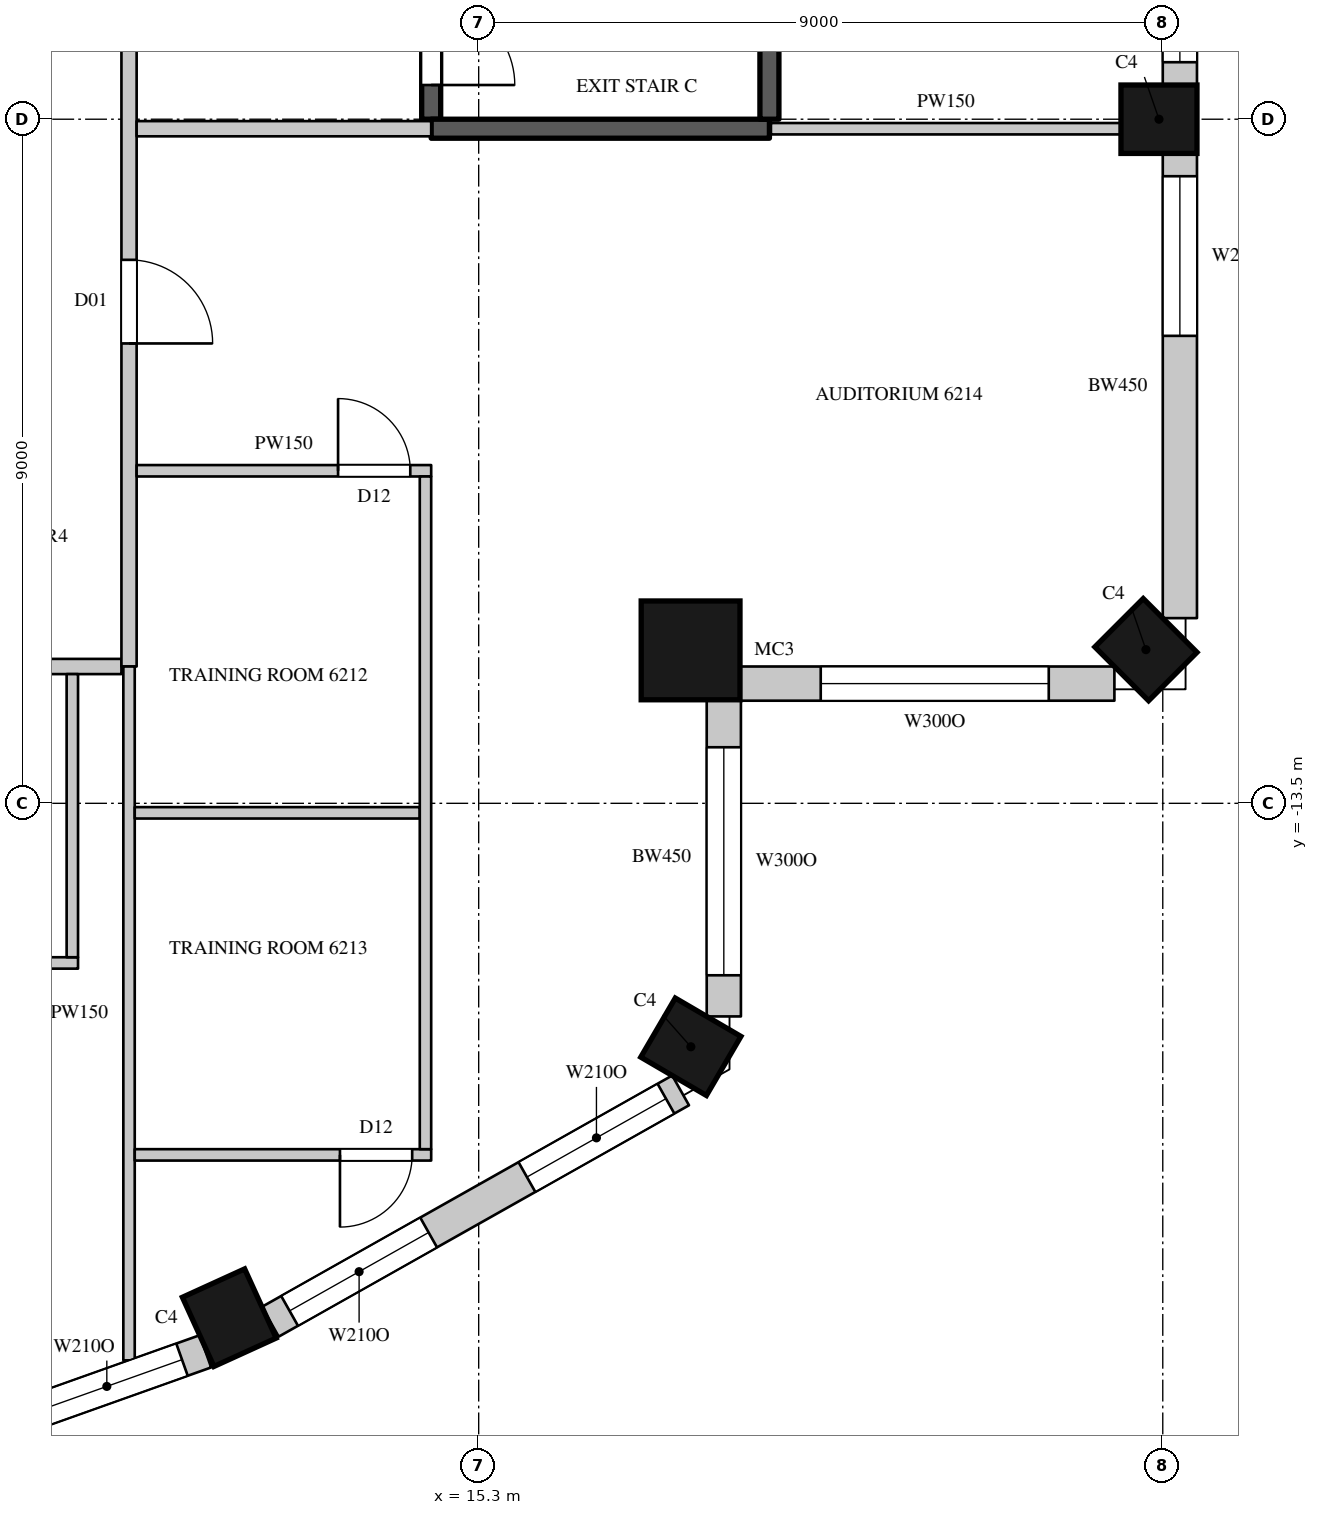
"""IFC4 building model, lengths in metres.
Left out: names, types, materials, properties, quantities, classifications, styles, units other than length and angle.
Written with IfcOpenShell. Run it as: python <this file> out.ifc"""

import sys

from ifc_helpers import new_model, si_unit, direction, frame, frame_2d, origin, origin_2d, place, context, subcontext, project, spatial, rectangle, circle, extrude, element, fill, save


model = new_model("IFC4")
c1 = context("Model", 3, precision=1e-05, world=origin(), true_north=direction((0.0, 1.0)))
c2 = subcontext(c1, "Body", "Model", "MODEL_VIEW")
j1 = project(units=[si_unit("LENGTHUNIT", "METRE"), si_unit("PLANEANGLEUNIT", "RADIAN")], contexts=[c1])
p1 = place(None, origin())
s1 = spatial("IfcSite", under=j1, at=p1, CompositionType="ELEMENT")
p2 = place(p1, origin())
s2 = spatial("IfcBuilding", under=s1, at=p2, CompositionType="ELEMENT")
p3 = place(p2, frame((0.0, 0.0, 276.2)))
s3 = spatial("IfcBuildingStorey", under=s2, at=p3, CompositionType="ELEMENT", Elevation=276.2)
for number, where, z_axis, x_axis in (
    (1, (12.019, -20.267, 0.0), (0.0, 0.0, 1.0), (0.91, 0.415, 0.0)),
    (2, (18.091, -16.703, 0.0), (0.0, 0.0, 1.0), (0.504, 0.863, 0.0)),
):
    element("IfcColumn", number, at=place(p3, frame(where, z_axis=z_axis, x_axis=x_axis)), inside=s3, PredefinedType="COLUMN", context=c2, shape_type="SweptSolid", body=[
        extrude(rectangle(XDim=0.9, YDim=1.0, at=origin_2d()), origin(), (0.0, 0.0, 1.0), 4.1),
    ])
p4 = place(p3, frame((18.088, -11.488, 0.0), z_axis=(0.0, 0.0, 1.0), x_axis=(1.0, 0.0, 0.0)))
e3 = element("IfcColumn", 3, at=p4, inside=s3, PredefinedType="COLUMN", context=c2, shape_type="SweptSolid", body=[
    extrude(circle(Radius=0.65, at=origin_2d()), origin(), (0.0, 0.0, 1.0), 4.1),
])
for number, where, z_axis, x_axis in (
    (4, (24.078, -11.478, 0.0), (0.0, 0.0, 1.0), (0.707, 0.707, 0.0)),
    (5, (24.25, -4.5, 0.0), (0.0, 0.0, 1.0), (0.0, 1.0, 0.0)),
):
    element("IfcColumn", number, at=place(p3, frame(where, z_axis=z_axis, x_axis=x_axis)), inside=s3, PredefinedType="COLUMN", context=c2, shape_type="SweptSolid", body=[
        extrude(rectangle(XDim=0.9, YDim=1.0, at=origin_2d()), origin(), (0.0, 0.0, 1.0), 4.1),
    ])
p5 = place(p3, frame((5.665, -22.859, 0.0), z_axis=(0.0, 0.0, 1.0), x_axis=(0.942108340262, 0.335308626803, 0.0)))
e6 = element("IfcWall", 6, at=p5, inside=s3, PredefinedType="SOLIDWALL", context=c2, shape_type="SweptSolid", body=[
    extrude(rectangle(XDim=6.412, YDim=0.45, at=frame_2d((3.206, 0.0))), origin(), (0.0, 0.0, 1.0), 3.8),
])
p6 = place(p5, frame((0.327, 0.0, 1.05)))
e7 = element("IfcOpeningElement", 7, at=p6, cuts=e6, PredefinedType="OPENING", context=c2, shape_type="SweptSolid", body=[
    extrude(rectangle(XDim=2.1, YDim=2.4, at=frame_2d((1.05, 1.2))), frame((0.0, 0.235, 0.0), z_axis=(0.0, -1.0, 0.0), x_axis=(1.0, 0.0, 0.0)), (0.0, 0.0, 1.0), 0.47),
])
p7 = place(p5, frame((3.985, 0.0, 1.05)))
e8 = element("IfcOpeningElement", 8, at=p7, cuts=e6, PredefinedType="OPENING", context=c2, shape_type="SweptSolid", body=[
    extrude(rectangle(XDim=2.1, YDim=2.4, at=frame_2d((1.05, 1.2))), frame((0.0, 0.235, 0.0), z_axis=(0.0, -1.0, 0.0), x_axis=(1.0, 0.0, 0.0)), (0.0, 0.0, 1.0), 0.47),
])
p8 = place(p3, frame((12.559, -20.32, 0.0), z_axis=(0.0, 0.0, 1.0), x_axis=(0.871065783524, 0.491166367714, 0.0)))
e9 = element("IfcWall", 9, at=p8, inside=s3, PredefinedType="SOLIDWALL", context=c2, shape_type="SweptSolid", body=[
    extrude(rectangle(XDim=6.196, YDim=0.45, at=frame_2d((3.098, 0.0))), origin(), (0.0, 0.0, 1.0), 3.8),
])
p9 = place(p8, frame((0.291, 0.0, 1.05)))
e10 = element("IfcOpeningElement", 10, at=p9, cuts=e9, PredefinedType="OPENING", context=c2, shape_type="SweptSolid", body=[
    extrude(rectangle(XDim=2.1, YDim=2.4, at=frame_2d((1.05, 1.2))), frame((0.0, 0.235, 0.0), z_axis=(0.0, -1.0, 0.0), x_axis=(1.0, 0.0, 0.0)), (0.0, 0.0, 1.0), 0.47),
])
p10 = place(p8, frame((3.875, 0.0, 1.05)))
e11 = element("IfcOpeningElement", 11, at=p10, cuts=e9, PredefinedType="OPENING", context=c2, shape_type="SweptSolid", body=[
    extrude(rectangle(XDim=2.1, YDim=2.4, at=frame_2d((1.05, 1.2))), frame((0.0, 0.235, 0.0), z_axis=(0.0, -1.0, 0.0), x_axis=(1.0, 0.0, 0.0)), (0.0, 0.0, 1.0), 0.47),
])
p11 = place(p3, frame((18.525, -16.304, 0.0), z_axis=(0.0, 0.0, 1.0), x_axis=(0.0, 1.0, 0.0)))
e12 = element("IfcWall", 12, at=p11, inside=s3, PredefinedType="SOLIDWALL", context=c2, shape_type="SweptSolid", body=[
    extrude(rectangle(XDim=4.202, YDim=0.45, at=frame_2d((2.101, 0.0))), origin(), (0.0, 0.0, 1.0), 3.8),
])
p12 = place(p11, frame((0.541, 0.0, 1.05)))
e13 = element("IfcOpeningElement", 13, at=p12, cuts=e12, PredefinedType="OPENING", context=c2, shape_type="SweptSolid", body=[
    extrude(rectangle(XDim=3.0, YDim=2.4, at=frame_2d((1.5, 1.2))), frame((0.0, 0.235, 0.0), z_axis=(0.0, -1.0, 0.0), x_axis=(1.0, 0.0, 0.0)), (0.0, 0.0, 1.0), 0.47),
])
p13 = place(p3, frame((18.701, -11.925, 0.0), z_axis=(0.0, 0.0, 1.0), x_axis=(1.0, 0.0, 0.0)))
e14 = element("IfcWall", 14, at=p13, inside=s3, PredefinedType="SOLIDWALL", context=c2, shape_type="SweptSolid", body=[
    extrude(rectangle(XDim=4.962, YDim=0.45, at=frame_2d((2.481, 0.0))), origin(), (0.0, 0.0, 1.0), 3.8),
])
p14 = place(p13, frame((1.098, 0.0, 1.05)))
e15 = element("IfcOpeningElement", 15, at=p14, cuts=e14, PredefinedType="OPENING", context=c2, shape_type="SweptSolid", body=[
    extrude(rectangle(XDim=3.0, YDim=2.4, at=frame_2d((1.5, 1.2))), frame((0.0, 0.235, 0.0), z_axis=(0.0, -1.0, 0.0), x_axis=(1.0, 0.0, 0.0)), (0.0, 0.0, 1.0), 0.47),
])
p15 = place(p3, frame((24.525, -11.064, 0.0), z_axis=(0.0, 0.0, 1.0), x_axis=(0.0, 1.0, 0.0)))
e16 = element("IfcWall", 16, at=p15, inside=s3, PredefinedType="SOLIDWALL", context=c2, shape_type="SweptSolid", body=[
    extrude(rectangle(XDim=6.114, YDim=0.45, at=frame_2d((3.057, 0.0))), origin(), (0.0, 0.0, 1.0), 3.8),
])
p16 = place(p15, frame((3.714, 0.0, 1.05)))
e17 = element("IfcOpeningElement", 17, at=p16, cuts=e16, PredefinedType="OPENING", context=c2, shape_type="SweptSolid", body=[
    extrude(rectangle(XDim=2.1, YDim=2.4, at=frame_2d((1.05, 1.2))), frame((0.0, 0.235, 0.0), z_axis=(0.0, -1.0, 0.0), x_axis=(1.0, 0.0, 0.0)), (0.0, 0.0, 1.0), 0.47),
])
p17 = place(p3, frame((24.525, -4.05, 0.0), z_axis=(0.0, 0.0, 1.0), x_axis=(0.0, 1.0, 0.0)))
e18 = element("IfcWall", 18, at=p17, inside=s3, PredefinedType="SOLIDWALL", context=c2, shape_type="SweptSolid", body=[
    extrude(rectangle(XDim=8.1, YDim=0.45, at=frame_2d((4.05, 0.0))), origin(), (0.0, 0.0, 1.0), 3.8),
])
p18 = place(p17, frame((0.3, 0.0, 1.05)))
e19 = element("IfcOpeningElement", 19, at=p18, cuts=e18, PredefinedType="OPENING", context=c2, shape_type="SweptSolid", body=[
    extrude(rectangle(XDim=3.0, YDim=2.4, at=frame_2d((1.5, 1.2))), frame((0.0, 0.235, 0.0), z_axis=(0.0, -1.0, 0.0), x_axis=(1.0, 0.0, 0.0)), (0.0, 0.0, 1.0), 0.47),
])
p19 = place(p17, frame((4.8, 0.0, 1.05)))
e20 = element("IfcOpeningElement", 20, at=p19, cuts=e18, PredefinedType="OPENING", context=c2, shape_type="SweptSolid", body=[
    extrude(rectangle(XDim=3.0, YDim=2.4, at=frame_2d((1.5, 1.2))), frame((0.0, 0.235, 0.0), z_axis=(0.0, -1.0, 0.0), x_axis=(1.0, 0.0, 0.0)), (0.0, 0.0, 1.0), 0.47),
])
p20 = place(p3, frame((-10.9, -11.7, 0.0), z_axis=(0.0, 0.0, 1.0), x_axis=(1.0, 0.0, 0.0)))
e21 = element("IfcWall", 21, at=p20, inside=s3, PredefinedType="PARTITIONING", context=c2, shape_type="SweptSolid", body=[
    extrude(rectangle(XDim=21.5, YDim=0.2, at=frame_2d((10.75, 0.0))), origin(), (0.0, 0.0, 1.0), 3.8),
])
p21 = place(p20, frame((0.95, 0.0, 0.0)))
e22 = element("IfcOpeningElement", 22, at=p21, cuts=e21, PredefinedType="OPENING", context=c2, shape_type="SweptSolid", body=[
    extrude(rectangle(XDim=0.95, YDim=2.2, at=frame_2d((0.475, 1.1))), frame((0.0, 0.11, 0.0), z_axis=(0.0, -1.0, 0.0), x_axis=(1.0, 0.0, 0.0)), (0.0, 0.0, 1.0), 0.22),
])
p22 = place(p20, frame((4.2, 0.0, 0.0)))
e23 = element("IfcOpeningElement", 23, at=p22, cuts=e21, PredefinedType="OPENING", context=c2, shape_type="SweptSolid", body=[
    extrude(rectangle(XDim=0.9, YDim=2.2, at=frame_2d((0.45, 1.1))), frame((0.0, 0.11, 0.0), z_axis=(0.0, -1.0, 0.0), x_axis=(1.0, 0.0, 0.0)), (0.0, 0.0, 1.0), 0.22),
])
p23 = place(p20, frame((6.85, 0.0, 0.0)))
e24 = element("IfcOpeningElement", 24, at=p23, cuts=e21, PredefinedType="OPENING", context=c2, shape_type="SweptSolid", body=[
    extrude(rectangle(XDim=1.1, YDim=2.4, at=frame_2d((0.55, 1.2))), frame((0.0, 0.11, 0.0), z_axis=(0.0, -1.0, 0.0), x_axis=(1.0, 0.0, 0.0)), (0.0, 0.0, 1.0), 0.22),
])
p24 = place(p20, frame((9.95, 0.0, 0.0)))
e25 = element("IfcOpeningElement", 25, at=p24, cuts=e21, PredefinedType="OPENING", context=c2, shape_type="SweptSolid", body=[
    extrude(rectangle(XDim=1.1, YDim=2.4, at=frame_2d((0.55, 1.2))), frame((0.0, 0.11, 0.0), z_axis=(0.0, -1.0, 0.0), x_axis=(1.0, 0.0, 0.0)), (0.0, 0.0, 1.0), 0.22),
])
p25 = place(p3, frame((10.7, -11.7, 0.0), z_axis=(0.0, 0.0, 1.0), x_axis=(0.0, 1.0, 0.0)))
e26 = element("IfcWall", 26, at=p25, inside=s3, PredefinedType="PARTITIONING", context=c2, shape_type="SweptSolid", body=[
    extrude(rectangle(XDim=23.8, YDim=0.2, at=frame_2d((11.9, 0.0))), origin(), (0.0, 0.0, 1.0), 3.8),
])
p26 = place(p25, frame((12.35, 0.0, 0.0)))
e27 = element("IfcOpeningElement", 27, at=p26, cuts=e26, PredefinedType="OPENING", context=c2, shape_type="SweptSolid", body=[
    extrude(rectangle(XDim=1.5, YDim=2.4, at=frame_2d((0.75, 1.2))), frame((0.0, 0.11, 0.0), z_axis=(0.0, -1.0, 0.0), x_axis=(1.0, 0.0, 0.0)), (0.0, 0.0, 1.0), 0.22),
])
p27 = place(p25, frame((19.55, 0.0, 0.0)))
e28 = element("IfcOpeningElement", 28, at=p27, cuts=e26, PredefinedType="OPENING", context=c2, shape_type="SweptSolid", body=[
    extrude(rectangle(XDim=1.1, YDim=2.4, at=frame_2d((0.55, 1.2))), frame((0.0, 0.11, 0.0), z_axis=(0.0, -1.0, 0.0), x_axis=(1.0, 0.0, 0.0)), (0.0, 0.0, 1.0), 0.22),
])
p28 = place(p25, frame((4.25, 0.0, 0.0)))
e29 = element("IfcOpeningElement", 29, at=p28, cuts=e26, PredefinedType="OPENING", context=c2, shape_type="SweptSolid", body=[
    extrude(rectangle(XDim=1.1, YDim=2.4, at=frame_2d((0.55, 1.2))), frame((0.0, 0.11, 0.0), z_axis=(0.0, -1.0, 0.0), x_axis=(1.0, 0.0, 0.0)), (0.0, 0.0, 1.0), 0.22),
])
p29 = place(p3, frame((10.8, -4.625, 0.0), z_axis=(0.0, 0.0, 1.0), x_axis=(1.0, 0.0, 0.0)))
e30 = element("IfcWall", 30, at=p29, inside=s3, PredefinedType="PARTITIONING", context=c2, shape_type="SweptSolid", body=[
    extrude(rectangle(XDim=3.875, YDim=0.2, at=frame_2d((1.938, 0.0))), origin(), (0.0, 0.0, 1.0), 3.8),
])
p30 = place(p3, frame((2.379, -15.6, 0.0), z_axis=(0.0, 0.0, 1.0), x_axis=(1.0, 0.0, 0.0)))
e31 = element("IfcWall", 31, at=p30, inside=s3, PredefinedType="PARTITIONING", context=c2, shape_type="SweptSolid", body=[
    extrude(rectangle(XDim=7.65, YDim=0.15, at=frame_2d((3.825, 0.0))), origin(), (0.0, 0.0, 1.0), 3.8),
])
p31 = place(p30, frame((4.85, 0.0, 0.0)))
e32 = element("IfcOpeningElement", 32, at=p31, cuts=e31, PredefinedType="OPENING", context=c2, shape_type="SweptSolid", body=[
    extrude(rectangle(XDim=0.95, YDim=2.2, at=frame_2d((0.475, 1.1))), frame((0.0, 0.085, 0.0), z_axis=(0.0, -1.0, 0.0), x_axis=(1.0, 0.0, 0.0)), (0.0, 0.0, 1.0), 0.17),
])
p32 = place(p3, frame((9.954, -15.525, 0.0), z_axis=(0.0, 0.0, 1.0), x_axis=(0.0, 1.0, 0.0)))
e33 = element("IfcWall", 33, at=p32, inside=s3, PredefinedType="PARTITIONING", context=c2, shape_type="SweptSolid", body=[
    extrude(rectangle(XDim=3.725, YDim=0.15, at=frame_2d((1.862, 0.0))), origin(), (0.0, 0.0, 1.0), 3.8),
])
p33 = place(p3, frame((10.7, -20.828, 0.0), z_axis=(0.0, 0.0, 1.0), x_axis=(0.0, 1.0, 0.0)))
e34 = element("IfcWall", 34, at=p33, inside=s3, PredefinedType="PARTITIONING", context=c2, shape_type="SweptSolid", body=[
    extrude(rectangle(XDim=9.128, YDim=0.15, at=frame_2d((4.564, 0.0))), origin(), (0.0, 0.0, 1.0), 3.8),
])
p34 = place(p3, frame((10.775, -18.125, 0.0), z_axis=(0.0, 0.0, 1.0), x_axis=(1.0, 0.0, 0.0)))
e35 = element("IfcWall", 35, at=p34, inside=s3, PredefinedType="PARTITIONING", context=c2, shape_type="SweptSolid", body=[
    extrude(rectangle(XDim=3.9, YDim=0.15, at=frame_2d((1.95, 0.0))), origin(), (0.0, 0.0, 1.0), 3.8),
])
p35 = place(p34, frame((2.7, 0.0, 0.0)))
e36 = element("IfcOpeningElement", 36, at=p35, cuts=e35, PredefinedType="OPENING", context=c2, shape_type="SweptSolid", body=[
    extrude(rectangle(XDim=0.95, YDim=2.2, at=frame_2d((0.475, 1.1))), frame((0.0, 0.085, 0.0), z_axis=(0.0, -1.0, 0.0), x_axis=(1.0, 0.0, 0.0)), (0.0, 0.0, 1.0), 0.17),
])
p36 = place(p3, frame((10.775, -13.625, 0.0), z_axis=(0.0, 0.0, 1.0), x_axis=(1.0, 0.0, 0.0)))
e37 = element("IfcWall", 37, at=p36, inside=s3, PredefinedType="PARTITIONING", context=c2, shape_type="SweptSolid", body=[
    extrude(rectangle(XDim=3.75, YDim=0.15, at=frame_2d((1.875, 0.0))), origin(), (0.0, 0.0, 1.0), 3.8),
])
p37 = place(p3, frame((10.8, -9.125, 0.0), z_axis=(0.0, 0.0, 1.0), x_axis=(1.0, 0.0, 0.0)))
e38 = element("IfcWall", 38, at=p37, inside=s3, PredefinedType="PARTITIONING", context=c2, shape_type="SweptSolid", body=[
    extrude(rectangle(XDim=3.875, YDim=0.15, at=frame_2d((1.938, 0.0))), origin(), (0.0, 0.0, 1.0), 3.8),
])
p38 = place(p37, frame((2.65, 0.0, 0.0)))
e39 = element("IfcOpeningElement", 39, at=p38, cuts=e38, PredefinedType="OPENING", context=c2, shape_type="SweptSolid", body=[
    extrude(rectangle(XDim=0.95, YDim=2.2, at=frame_2d((0.475, 1.1))), frame((0.0, 0.085, 0.0), z_axis=(0.0, -1.0, 0.0), x_axis=(1.0, 0.0, 0.0)), (0.0, 0.0, 1.0), 0.17),
])
p39 = place(p3, frame((14.6, -18.05, 0.0), z_axis=(0.0, 0.0, 1.0), x_axis=(0.0, 1.0, 0.0)))
e40 = element("IfcWall", 40, at=p39, inside=s3, PredefinedType="PARTITIONING", context=c2, shape_type="SweptSolid", body=[
    extrude(rectangle(XDim=8.85, YDim=0.15, at=frame_2d((4.425, 0.0))), origin(), (0.0, 0.0, 1.0), 3.8),
])
p40 = place(p3, frame((19.145, -4.625, 0.0), z_axis=(0.0, 0.0, 1.0), x_axis=(1.0, 0.0, 0.0)))
e41 = element("IfcWall", 41, at=p40, inside=s3, PredefinedType="PARTITIONING", context=c2, shape_type="SweptSolid", body=[
    extrude(rectangle(XDim=4.605, YDim=0.15, at=frame_2d((2.302, 0.0))), origin(), (0.0, 0.0, 1.0), 3.8),
])
p41 = place(p3, frame((14.675, -4.5, 0.0), z_axis=(0.0, 0.0, 1.0), x_axis=(0.0, 1.0, 0.0)))
e42 = element("IfcWall", 42, at=p41, inside=s3, PredefinedType="SHEAR", context=c2, shape_type="SweptSolid", body=[
    extrude(rectangle(XDim=9.0, YDim=0.25, at=frame_2d((4.5, 0.0))), origin(), (0.0, 0.0, 1.0), 3.8),
])
p42 = place(p41, frame((0.45, 0.0, 0.0)))
e43 = element("IfcOpeningElement", 43, at=p42, cuts=e42, PredefinedType="OPENING", context=c2, shape_type="SweptSolid", body=[
    extrude(rectangle(XDim=1.1, YDim=2.2, at=frame_2d((0.55, 1.1))), frame((0.0, 0.135, 0.0), z_axis=(0.0, -1.0, 0.0), x_axis=(1.0, 0.0, 0.0)), (0.0, 0.0, 1.0), 0.27),
])
p43 = place(p3, frame((14.675, -4.625, 0.0), z_axis=(0.0, 0.0, 1.0), x_axis=(1.0, 0.0, 0.0)))
e44 = element("IfcWall", 44, at=p43, inside=s3, PredefinedType="SHEAR", context=c2, shape_type="SweptSolid", body=[
    extrude(rectangle(XDim=4.45, YDim=0.25, at=frame_2d((2.225, 0.0))), origin(), (0.0, 0.0, 1.0), 3.8),
])
p44 = place(p3, frame((19.125, -4.5, 0.0), z_axis=(0.0, 0.0, 1.0), x_axis=(0.0, 1.0, 0.0)))
e45 = element("IfcWall", 45, at=p44, inside=s3, PredefinedType="SHEAR", context=c2, shape_type="SweptSolid", body=[
    extrude(rectangle(XDim=9.0, YDim=0.25, at=frame_2d((4.5, 0.0))), origin(), (0.0, 0.0, 1.0), 3.8),
])
p45 = place(p7, origin())
e46 = element("IfcWindow", 46, at=p45, inside=s3, PartitioningType="SINGLE_PANEL", PredefinedType="WINDOW", context=c2, shape_type="SweptSolid", body=[
    extrude(rectangle(XDim=2.1, YDim=2.4, at=frame_2d((1.05, 1.2))), frame((0.0, 0.135, 0.0), z_axis=(0.0, -1.0, 0.0), x_axis=(1.0, 0.0, 0.0)), (0.0, 0.0, 1.0), 0.06),
])
fill(e8, e46)
p46 = place(p9, origin())
e47 = element("IfcWindow", 47, at=p46, inside=s3, PartitioningType="SINGLE_PANEL", PredefinedType="WINDOW", context=c2, shape_type="SweptSolid", body=[
    extrude(rectangle(XDim=2.1, YDim=2.4, at=frame_2d((1.05, 1.2))), frame((0.0, 0.135, 0.0), z_axis=(0.0, -1.0, 0.0), x_axis=(1.0, 0.0, 0.0)), (0.0, 0.0, 1.0), 0.06),
])
fill(e10, e47)
p47 = place(p10, origin())
e48 = element("IfcWindow", 48, at=p47, inside=s3, PartitioningType="SINGLE_PANEL", PredefinedType="WINDOW", context=c2, shape_type="SweptSolid", body=[
    extrude(rectangle(XDim=2.1, YDim=2.4, at=frame_2d((1.05, 1.2))), frame((0.0, 0.135, 0.0), z_axis=(0.0, -1.0, 0.0), x_axis=(1.0, 0.0, 0.0)), (0.0, 0.0, 1.0), 0.06),
])
fill(e11, e48)
p48 = place(p12, origin())
e49 = element("IfcWindow", 49, at=p48, inside=s3, PartitioningType="SINGLE_PANEL", PredefinedType="WINDOW", context=c2, shape_type="SweptSolid", body=[
    extrude(rectangle(XDim=3.0, YDim=2.4, at=frame_2d((1.5, 1.2))), frame((0.0, 0.135, 0.0), z_axis=(0.0, -1.0, 0.0), x_axis=(1.0, 0.0, 0.0)), (0.0, 0.0, 1.0), 0.06),
])
fill(e13, e49)
p49 = place(p14, origin())
e50 = element("IfcWindow", 50, at=p49, inside=s3, PartitioningType="SINGLE_PANEL", PredefinedType="WINDOW", context=c2, shape_type="SweptSolid", body=[
    extrude(rectangle(XDim=3.0, YDim=2.4, at=frame_2d((1.5, 1.2))), frame((0.0, 0.135, 0.0), z_axis=(0.0, -1.0, 0.0), x_axis=(1.0, 0.0, 0.0)), (0.0, 0.0, 1.0), 0.06),
])
fill(e15, e50)
p50 = place(p16, origin())
e51 = element("IfcWindow", 51, at=p50, inside=s3, PartitioningType="SINGLE_PANEL", PredefinedType="WINDOW", context=c2, shape_type="SweptSolid", body=[
    extrude(rectangle(XDim=2.1, YDim=2.4, at=frame_2d((1.05, 1.2))), frame((0.0, 0.135, 0.0), z_axis=(0.0, -1.0, 0.0), x_axis=(1.0, 0.0, 0.0)), (0.0, 0.0, 1.0), 0.06),
])
fill(e17, e51)
p51 = place(p18, origin())
e52 = element("IfcWindow", 52, at=p51, inside=s3, PartitioningType="SINGLE_PANEL", PredefinedType="WINDOW", context=c2, shape_type="SweptSolid", body=[
    extrude(rectangle(XDim=3.0, YDim=2.4, at=frame_2d((1.5, 1.2))), frame((0.0, 0.135, 0.0), z_axis=(0.0, -1.0, 0.0), x_axis=(1.0, 0.0, 0.0)), (0.0, 0.0, 1.0), 0.06),
])
fill(e19, e52)
p52 = place(p28, origin())
e53 = element("IfcDoor", 53, at=p52, inside=s3, OperationType="SINGLE_SWING_RIGHT", PredefinedType="DOOR", context=c2, shape_type="SweptSolid", body=[
    extrude(rectangle(XDim=1.1, YDim=2.4, at=frame_2d((0.55, 1.2))), frame((0.0, 0.025, 0.0), z_axis=(0.0, -1.0, 0.0), x_axis=(1.0, 0.0, 0.0)), (0.0, 0.0, 1.0), 0.05),
])
fill(e29, e53)
p53 = place(p38, origin())
e54 = element("IfcDoor", 54, at=p53, inside=s3, OperationType="SINGLE_SWING_LEFT", PredefinedType="DOOR", context=c2, shape_type="SweptSolid", body=[
    extrude(rectangle(XDim=0.95, YDim=2.2, at=frame_2d((0.475, 1.1))), frame((0.0, 0.025, 0.0), z_axis=(0.0, -1.0, 0.0), x_axis=(1.0, 0.0, 0.0)), (0.0, 0.0, 1.0), 0.05),
])
fill(e39, e54)
p54 = place(p35, origin())
e55 = element("IfcDoor", 55, at=p54, inside=s3, OperationType="SINGLE_SWING_RIGHT", PredefinedType="DOOR", context=c2, shape_type="SweptSolid", body=[
    extrude(rectangle(XDim=0.95, YDim=2.2, at=frame_2d((0.475, 1.1))), frame((0.0, 0.025, 0.0), z_axis=(0.0, -1.0, 0.0), x_axis=(1.0, 0.0, 0.0)), (0.0, 0.0, 1.0), 0.05),
])
fill(e36, e55)
p55 = place(p42, origin())
e56 = element("IfcDoor", 56, at=p55, inside=s3, OperationType="SINGLE_SWING_RIGHT", PredefinedType="DOOR", context=c2, shape_type="SweptSolid", body=[
    extrude(rectangle(XDim=1.1, YDim=2.2, at=frame_2d((0.55, 1.1))), frame((0.0, 0.025, 0.0), z_axis=(0.0, -1.0, 0.0), x_axis=(1.0, 0.0, 0.0)), (0.0, 0.0, 1.0), 0.05),
])
fill(e43, e56)
save(model, sys.argv[1])
